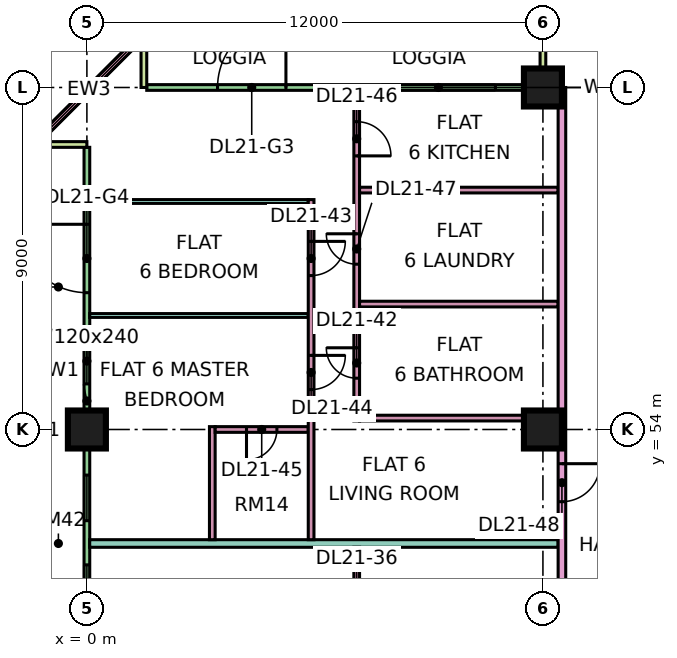
"""IFC4 building model, lengths in metres.
Left out: names, types, materials, properties, quantities, classifications, styles, units other than length and angle.
Written with IfcOpenShell. Run it as: python <this file> out.ifc"""

import sys

from ifc_helpers import new_model, si_unit, direction, frame, frame_2d, origin, origin_2d, place, context, subcontext, project, spatial, rectangle, extrude, element, fill, save


model = new_model("IFC4")
c1 = context("Model", 3, precision=1e-05, world=origin(), true_north=direction((0.0, 1.0)))
c2 = subcontext(c1, "Body", "Model", "MODEL_VIEW")
j1 = project(units=[si_unit("LENGTHUNIT", "METRE"), si_unit("PLANEANGLEUNIT", "RADIAN")], contexts=[c1])
p1 = place(None, origin())
s1 = spatial("IfcSite", under=j1, at=p1, CompositionType="ELEMENT")
p2 = place(p1, origin())
s2 = spatial("IfcBuilding", under=s1, at=p2, CompositionType="ELEMENT")
p3 = place(p2, frame((0.0, 0.0, 95.65)))
s3 = spatial("IfcBuildingStorey", under=s2, at=p3, CompositionType="ELEMENT", Elevation=95.65)
for number, where, z_axis, x_axis in (
    (1, (0.0, 54.0, 0.0), (0.0, 0.0, 1.0), (1.0, 0.0, 0.0)),
    (2, (12.0, 54.0, 0.0), (0.0, 0.0, 1.0), (1.0, 0.0, 0.0)),
    (3, (12.0, 63.0, 0.0), (0.0, 0.0, 1.0), (1.0, 0.0, 0.0)),
):
    element("IfcColumn", number, at=place(p3, frame(where, z_axis=z_axis, x_axis=x_axis)), inside=s3, PredefinedType="COLUMN", context=c2, shape_type="SweptSolid", body=[
        extrude(rectangle(XDim=1.0, YDim=1.0, at=origin_2d()), origin(), (0.0, 0.0, 1.0), 3.75),
    ])
p4 = place(p3, frame((11.925, 63.0, 0.0), z_axis=(0.0, 0.0, 1.0), x_axis=(-1.0, 0.0, 0.0)))
e4 = element("IfcWall", 4, at=p4, inside=s3, PredefinedType="SOLIDWALL", context=c2, shape_type="SweptSolid", body=[
    extrude(rectangle(XDim=10.35, YDim=0.15, at=frame_2d((5.175, 0.0))), origin(), (0.0, 0.0, 1.0), 3.35),
])
p5 = place(p4, frame((1.175, 0.0, 0.45)))
e5 = element("IfcOpeningElement", 5, at=p5, cuts=e4, PredefinedType="OPENING", context=c2, shape_type="SweptSolid", body=[
    extrude(rectangle(XDim=3.0, YDim=2.4, at=frame_2d((1.5, 1.2))), frame((0.0, 0.085, 0.0), z_axis=(0.0, -1.0, 0.0), x_axis=(1.0, 0.0, 0.0)), (0.0, 0.0, 1.0), 0.17),
])
p6 = place(p4, frame((6.688, 0.0, 0.0)))
e6 = element("IfcOpeningElement", 6, at=p6, cuts=e4, PredefinedType="OPENING", context=c2, shape_type="SweptSolid", body=[
    extrude(rectangle(XDim=1.8, YDim=2.4, at=frame_2d((0.9, 1.2))), frame((0.0, 0.085, 0.0), z_axis=(0.0, -1.0, 0.0), x_axis=(1.0, 0.0, 0.0)), (0.0, 0.0, 1.0), 0.17),
])
for number, where, z_axis, x_axis in (
    (7, (12.0, 64.5, 0.0), (0.0, 0.0, 1.0), (0.0, -1.0, 0.0)),
    (8, (1.5, 64.5, 0.0), (0.0, 0.0, 1.0), (0.0, -1.0, 0.0)),
):
    element("IfcWall", number, at=place(p3, frame(where, z_axis=z_axis, x_axis=x_axis)), inside=s3, PredefinedType="SOLIDWALL", context=c2, shape_type="SweptSolid", body=[
        extrude(rectangle(XDim=1.5, YDim=0.15, at=frame_2d((0.75, 0.0))), origin(), (0.0, 0.0, 1.0), 3.35),
    ])
p7 = place(p3, frame((1.553, 64.447, 0.0), z_axis=(0.0, 0.0, 1.0), x_axis=(-0.707106781187, -0.707106781187, 0.0)))
e9 = element("IfcWall", 9, at=p7, inside=s3, PredefinedType="SOLIDWALL", context=c2, shape_type="SweptSolid", body=[
    extrude(rectangle(XDim=4.243, YDim=0.15, at=frame_2d((2.121, 0.0))), origin(), (0.0, 0.0, 1.0), 3.35),
])
p8 = place(p7, frame((0.621, 0.0, 0.45)))
e10 = element("IfcOpeningElement", 10, at=p8, cuts=e9, PredefinedType="OPENING", context=c2, shape_type="SweptSolid", body=[
    extrude(rectangle(XDim=3.0, YDim=2.4, at=frame_2d((1.5, 1.2))), frame((0.0, 0.085, 0.0), z_axis=(0.0, -1.0, 0.0), x_axis=(1.0, 0.0, 0.0)), (0.0, 0.0, 1.0), 0.17),
])
p9 = place(p3, frame((0.0, 61.425, 0.0), z_axis=(0.0, 0.0, 1.0), x_axis=(0.0, -1.0, 0.0)))
e11 = element("IfcWall", 11, at=p9, inside=s3, PredefinedType="SOLIDWALL", context=c2, shape_type="SweptSolid", body=[
    extrude(rectangle(XDim=13.35, YDim=0.15, at=frame_2d((6.675, 0.0))), origin(), (0.0, 0.0, 1.0), 3.35),
])
p10 = place(p9, frame((2.025, 0.0, 0.0)))
e12 = element("IfcOpeningElement", 12, at=p10, cuts=e11, PredefinedType="OPENING", context=c2, shape_type="SweptSolid", body=[
    extrude(rectangle(XDim=1.8, YDim=2.4, at=frame_2d((0.9, 1.2))), frame((0.0, 0.085, 0.0), z_axis=(0.0, -1.0, 0.0), x_axis=(1.0, 0.0, 0.0)), (0.0, 0.0, 1.0), 0.17),
])
p11 = place(p9, frame((5.025, 0.0, 0.45)))
e13 = element("IfcOpeningElement", 13, at=p11, cuts=e11, PredefinedType="OPENING", context=c2, shape_type="SweptSolid", body=[
    extrude(rectangle(XDim=1.2, YDim=2.4, at=frame_2d((0.6, 1.2))), frame((0.0, 0.085, 0.0), z_axis=(0.0, -1.0, 0.0), x_axis=(1.0, 0.0, 0.0)), (0.0, 0.0, 1.0), 0.17),
])
p12 = place(p9, frame((8.625, 0.0, 0.45)))
e14 = element("IfcOpeningElement", 14, at=p12, cuts=e11, PredefinedType="OPENING", context=c2, shape_type="SweptSolid", body=[
    extrude(rectangle(XDim=1.2, YDim=2.4, at=frame_2d((0.6, 1.2))), frame((0.0, 0.085, 0.0), z_axis=(0.0, -1.0, 0.0), x_axis=(1.0, 0.0, 0.0)), (0.0, 0.0, 1.0), 0.17),
])
p13 = place(p9, frame((10.988, 0.0, 0.45)))
e15 = element("IfcOpeningElement", 15, at=p13, cuts=e11, PredefinedType="OPENING", context=c2, shape_type="SweptSolid", body=[
    extrude(rectangle(XDim=1.8, YDim=2.4, at=frame_2d((0.9, 1.2))), frame((0.0, 0.085, 0.0), z_axis=(0.0, -1.0, 0.0), x_axis=(1.0, 0.0, 0.0)), (0.0, 0.0, 1.0), 0.17),
])
p14 = place(p3, frame((-1.5, 61.5, 0.0), z_axis=(0.0, 0.0, 1.0), x_axis=(1.0, 0.0, 0.0)))
e16 = element("IfcWall", 16, at=p14, inside=s3, PredefinedType="SOLIDWALL", context=c2, shape_type="SweptSolid", body=[
    extrude(rectangle(XDim=1.5, YDim=0.15, at=frame_2d((0.75, 0.0))), origin(), (0.0, 0.0, 1.0), 3.35),
])
p15 = place(p3, frame((0.074, 51.0, 0.0), z_axis=(0.0, 0.0, 1.0), x_axis=(1.0, 0.0, 0.0)))
e17 = element("IfcWall", 17, at=p15, inside=s3, PredefinedType="PARTITIONING", context=c2, shape_type="SweptSolid", body=[
    extrude(rectangle(XDim=12.326, YDim=0.2, at=frame_2d((6.163, 0.0))), origin(), (0.0, 0.0, 1.0), 3.35),
])
for number, where, z_axis, x_axis in (
    (18, (0.074, 57.0, 0.0), (0.0, 0.0, 1.0), (1.0, 0.0, 0.0)),
    (19, (0.074, 60.0, 0.0), (0.0, 0.0, 1.0), (1.0, 0.0, 0.0)),
):
    element("IfcWall", number, at=place(p3, frame(where, z_axis=z_axis, x_axis=x_axis)), inside=s3, PredefinedType="PARTITIONING", context=c2, shape_type="SweptSolid", body=[
        extrude(rectangle(XDim=5.751, YDim=0.1, at=frame_2d((2.875, 0.0))), origin(), (0.0, 0.0, 1.0), 3.35),
    ])
p16 = place(p3, frame((3.3, 51.1, 0.0), z_axis=(0.0, 0.0, 1.0), x_axis=(0.0, 1.0, 0.0)))
e20 = element("IfcWall", 20, at=p16, inside=s3, PredefinedType="PARTITIONING", context=c2, shape_type="SweptSolid", body=[
    extrude(rectangle(XDim=2.975, YDim=0.15, at=frame_2d((1.487, 0.0))), origin(), (0.0, 0.0, 1.0), 3.35),
])
p17 = place(p3, frame((3.375, 54.0, 0.0), z_axis=(0.0, 0.0, 1.0), x_axis=(1.0, 0.0, 0.0)))
e21 = element("IfcWall", 21, at=p17, inside=s3, PredefinedType="PARTITIONING", context=c2, shape_type="SweptSolid", body=[
    extrude(rectangle(XDim=2.45, YDim=0.15, at=frame_2d((1.225, 0.0))), origin(), (0.0, 0.0, 1.0), 3.35),
])
p18 = place(p17, frame((0.825, 0.0, 0.0)))
e22 = element("IfcOpeningElement", 22, at=p18, cuts=e21, PredefinedType="OPENING", context=c2, shape_type="SweptSolid", body=[
    extrude(rectangle(XDim=0.8, YDim=2.1, at=frame_2d((0.4, 1.05))), frame((0.0, 0.085, 0.0), z_axis=(0.0, -1.0, 0.0), x_axis=(1.0, 0.0, 0.0)), (0.0, 0.0, 1.0), 0.17),
])
p19 = place(p3, frame((5.9, 51.1, 0.0), z_axis=(0.0, 0.0, 1.0), x_axis=(0.0, 1.0, 0.0)))
e23 = element("IfcWall", 23, at=p19, inside=s3, PredefinedType="PARTITIONING", context=c2, shape_type="SweptSolid", body=[
    extrude(rectangle(XDim=8.95, YDim=0.15, at=frame_2d((4.475, 0.0))), origin(), (0.0, 0.0, 1.0), 3.35),
])
p20 = place(p19, frame((6.95, 0.0, 0.0)))
e24 = element("IfcOpeningElement", 24, at=p20, cuts=e23, PredefinedType="OPENING", context=c2, shape_type="SweptSolid", body=[
    extrude(rectangle(XDim=0.9, YDim=2.1, at=frame_2d((0.45, 1.05))), frame((0.0, 0.085, 0.0), z_axis=(0.0, -1.0, 0.0), x_axis=(1.0, 0.0, 0.0)), (0.0, 0.0, 1.0), 0.17),
])
p21 = place(p19, frame((3.95, 0.0, 0.0)))
e25 = element("IfcOpeningElement", 25, at=p21, cuts=e23, PredefinedType="OPENING", context=c2, shape_type="SweptSolid", body=[
    extrude(rectangle(XDim=0.9, YDim=2.1, at=frame_2d((0.45, 1.05))), frame((0.0, 0.085, 0.0), z_axis=(0.0, -1.0, 0.0), x_axis=(1.0, 0.0, 0.0)), (0.0, 0.0, 1.0), 0.17),
])
p22 = place(p3, frame((7.1, 41.925, 0.0), z_axis=(0.0, 0.0, 1.0), x_axis=(0.0, 1.0, 0.0)))
e26 = element("IfcWall", 26, at=p22, inside=s3, PredefinedType="PARTITIONING", context=c2, shape_type="SweptSolid", body=[
    extrude(rectangle(XDim=8.975, YDim=0.15, at=frame_2d((4.487, 0.0))), origin(), (0.0, 0.0, 1.0), 3.35),
])
p23 = place(p22, frame((7.125, 0.0, 0.0)))
e27 = element("IfcOpeningElement", 27, at=p23, cuts=e26, PredefinedType="OPENING", context=c2, shape_type="SweptSolid", body=[
    extrude(rectangle(XDim=0.9, YDim=2.1, at=frame_2d((0.45, 1.05))), frame((0.0, 0.085, 0.0), z_axis=(0.0, -1.0, 0.0), x_axis=(1.0, 0.0, 0.0)), (0.0, 0.0, 1.0), 0.17),
])
p24 = place(p22, frame((4.125, 0.0, 0.0)))
e28 = element("IfcOpeningElement", 28, at=p24, cuts=e26, PredefinedType="OPENING", context=c2, shape_type="SweptSolid", body=[
    extrude(rectangle(XDim=0.9, YDim=2.1, at=frame_2d((0.45, 1.05))), frame((0.0, 0.085, 0.0), z_axis=(0.0, -1.0, 0.0), x_axis=(1.0, 0.0, 0.0)), (0.0, 0.0, 1.0), 0.17),
])
p25 = place(p3, frame((7.1, 54.225, 0.0), z_axis=(0.0, 0.0, 1.0), x_axis=(0.0, 1.0, 0.0)))
e29 = element("IfcWall", 29, at=p25, inside=s3, PredefinedType="PARTITIONING", context=c2, shape_type="SweptSolid", body=[
    extrude(rectangle(XDim=8.701, YDim=0.15, at=frame_2d((4.351, 0.0))), origin(), (0.0, 0.0, 1.0), 3.35),
])
p26 = place(p25, frame((1.125, 0.0, 0.0)))
e30 = element("IfcOpeningElement", 30, at=p26, cuts=e29, PredefinedType="OPENING", context=c2, shape_type="SweptSolid", body=[
    extrude(rectangle(XDim=0.8, YDim=2.1, at=frame_2d((0.4, 1.05))), frame((0.0, 0.085, 0.0), z_axis=(0.0, -1.0, 0.0), x_axis=(1.0, 0.0, 0.0)), (0.0, 0.0, 1.0), 0.17),
])
p27 = place(p25, frame((6.975, 0.0, 0.0)))
e31 = element("IfcOpeningElement", 31, at=p27, cuts=e29, PredefinedType="OPENING", context=c2, shape_type="SweptSolid", body=[
    extrude(rectangle(XDim=0.9, YDim=2.1, at=frame_2d((0.45, 1.05))), frame((0.0, 0.085, 0.0), z_axis=(0.0, -1.0, 0.0), x_axis=(1.0, 0.0, 0.0)), (0.0, 0.0, 1.0), 0.17),
])
p28 = place(p25, frame((4.125, 0.0, 0.0)))
e32 = element("IfcOpeningElement", 32, at=p28, cuts=e29, PredefinedType="OPENING", context=c2, shape_type="SweptSolid", body=[
    extrude(rectangle(XDim=0.8, YDim=2.1, at=frame_2d((0.4, 1.05))), frame((0.0, 0.085, 0.0), z_axis=(0.0, -1.0, 0.0), x_axis=(1.0, 0.0, 0.0)), (0.0, 0.0, 1.0), 0.17),
])
for number, where, z_axis, x_axis in (
    (33, (7.175, 54.3, 0.0), (0.0, 0.0, 1.0), (1.0, 0.0, 0.0)),
    (34, (7.175, 57.3, 0.0), (0.0, 0.0, 1.0), (1.0, 0.0, 0.0)),
    (35, (7.175, 60.3, 0.0), (0.0, 0.0, 1.0), (1.0, 0.0, 0.0)),
):
    element("IfcWall", number, at=place(p3, frame(where, z_axis=z_axis, x_axis=x_axis)), inside=s3, PredefinedType="PARTITIONING", context=c2, shape_type="SweptSolid", body=[
        extrude(rectangle(XDim=5.225, YDim=0.15, at=frame_2d((2.612, 0.0))), origin(), (0.0, 0.0, 1.0), 3.35),
    ])
p29 = place(p3, frame((12.5, 20.0, 0.0), z_axis=(0.0, 0.0, 1.0), x_axis=(0.0, 1.0, 0.0)))
e36 = element("IfcWall", 36, at=p29, inside=s3, PredefinedType="PARTITIONING", context=c2, shape_type="SweptSolid", body=[
    extrude(rectangle(XDim=43.0, YDim=0.2, at=frame_2d((21.5, 0.0))), origin(), (0.0, 0.0, 1.0), 3.35),
])
p30 = place(p29, frame((28.65, 0.0, 0.0)))
e37 = element("IfcOpeningElement", 37, at=p30, cuts=e36, PredefinedType="OPENING", context=c2, shape_type="SweptSolid", body=[
    extrude(rectangle(XDim=1.0, YDim=2.1, at=frame_2d((0.5, 1.05))), frame((0.0, 0.11, 0.0), z_axis=(0.0, -1.0, 0.0), x_axis=(1.0, 0.0, 0.0)), (0.0, 0.0, 1.0), 0.22),
])
p31 = place(p29, frame((32.1, 0.0, 0.0)))
e38 = element("IfcOpeningElement", 38, at=p31, cuts=e36, PredefinedType="OPENING", context=c2, shape_type="SweptSolid", body=[
    extrude(rectangle(XDim=1.0, YDim=2.1, at=frame_2d((0.5, 1.05))), frame((0.0, 0.11, 0.0), z_axis=(0.0, -1.0, 0.0), x_axis=(1.0, 0.0, 0.0)), (0.0, 0.0, 1.0), 0.22),
])
p32 = place(p29, frame((0.6, 0.0, 0.0)))
e39 = element("IfcOpeningElement", 39, at=p32, cuts=e36, PredefinedType="OPENING", context=c2, shape_type="SweptSolid", body=[
    extrude(rectangle(XDim=1.2, YDim=2.1, at=frame_2d((0.6, 1.05))), frame((0.0, 0.11, 0.0), z_axis=(0.0, -1.0, 0.0), x_axis=(1.0, 0.0, 0.0)), (0.0, 0.0, 1.0), 0.22),
])
p33 = place(p29, frame((11.1, 0.0, 0.0)))
e40 = element("IfcOpeningElement", 40, at=p33, cuts=e36, PredefinedType="OPENING", context=c2, shape_type="SweptSolid", body=[
    extrude(rectangle(XDim=1.0, YDim=2.1, at=frame_2d((0.5, 1.05))), frame((0.0, 0.11, 0.0), z_axis=(0.0, -1.0, 0.0), x_axis=(1.0, 0.0, 0.0)), (0.0, 0.0, 1.0), 0.22),
])
p34 = place(p5, origin())
e41 = element("IfcWindow", 41, at=p34, inside=s3, PartitioningType="SINGLE_PANEL", PredefinedType="WINDOW", context=c2, shape_type="SweptSolid", body=[
    extrude(rectangle(XDim=3.0, YDim=2.4, at=frame_2d((1.5, 1.2))), frame((0.0, 0.03, 0.0), z_axis=(0.0, -1.0, 0.0), x_axis=(1.0, 0.0, 0.0)), (0.0, 0.0, 1.0), 0.06),
])
fill(e5, e41)
p35 = place(p6, frame((1.8, 0.0, 0.0), z_axis=(0.0, 0.0, 1.0), x_axis=(-1.0, 0.0, 0.0)))
e42 = element("IfcDoor", 42, at=p35, inside=s3, OperationType="DOUBLE_DOOR_SINGLE_SWING", PredefinedType="DOOR", context=c2, shape_type="SweptSolid", body=[
    extrude(rectangle(XDim=1.8, YDim=2.4, at=frame_2d((0.9, 1.2))), frame((0.0, 0.025, 0.0), z_axis=(0.0, -1.0, 0.0), x_axis=(1.0, 0.0, 0.0)), (0.0, 0.0, 1.0), 0.05),
])
fill(e6, e42)
p36 = place(p8, origin())
e43 = element("IfcWindow", 43, at=p36, inside=s3, PartitioningType="SINGLE_PANEL", PredefinedType="WINDOW", context=c2, shape_type="SweptSolid", body=[
    extrude(rectangle(XDim=3.0, YDim=2.4, at=frame_2d((1.5, 1.2))), frame((0.0, 0.03, 0.0), z_axis=(0.0, -1.0, 0.0), x_axis=(1.0, 0.0, 0.0)), (0.0, 0.0, 1.0), 0.06),
])
fill(e10, e43)
p37 = place(p10, frame((1.8, 0.0, 0.0), z_axis=(0.0, 0.0, 1.0), x_axis=(-1.0, 0.0, 0.0)))
e44 = element("IfcDoor", 44, at=p37, inside=s3, OperationType="DOUBLE_DOOR_SINGLE_SWING", PredefinedType="DOOR", context=c2, shape_type="SweptSolid", body=[
    extrude(rectangle(XDim=1.8, YDim=2.4, at=frame_2d((0.9, 1.2))), frame((0.0, 0.025, 0.0), z_axis=(0.0, -1.0, 0.0), x_axis=(1.0, 0.0, 0.0)), (0.0, 0.0, 1.0), 0.05),
])
fill(e12, e44)
p38 = place(p11, origin())
e45 = element("IfcWindow", 45, at=p38, inside=s3, PartitioningType="SINGLE_PANEL", PredefinedType="WINDOW", context=c2, shape_type="SweptSolid", body=[
    extrude(rectangle(XDim=1.2, YDim=2.4, at=frame_2d((0.6, 1.2))), frame((0.0, 0.03, 0.0), z_axis=(0.0, -1.0, 0.0), x_axis=(1.0, 0.0, 0.0)), (0.0, 0.0, 1.0), 0.06),
])
fill(e13, e45)
p39 = place(p12, origin())
e46 = element("IfcWindow", 46, at=p39, inside=s3, PartitioningType="SINGLE_PANEL", PredefinedType="WINDOW", context=c2, shape_type="SweptSolid", body=[
    extrude(rectangle(XDim=1.2, YDim=2.4, at=frame_2d((0.6, 1.2))), frame((0.0, 0.03, 0.0), z_axis=(0.0, -1.0, 0.0), x_axis=(1.0, 0.0, 0.0)), (0.0, 0.0, 1.0), 0.06),
])
fill(e14, e46)
p40 = place(p13, origin())
e47 = element("IfcWindow", 47, at=p40, inside=s3, PartitioningType="SINGLE_PANEL", PredefinedType="WINDOW", context=c2, shape_type="SweptSolid", body=[
    extrude(rectangle(XDim=1.8, YDim=2.4, at=frame_2d((0.9, 1.2))), frame((0.0, 0.03, 0.0), z_axis=(0.0, -1.0, 0.0), x_axis=(1.0, 0.0, 0.0)), (0.0, 0.0, 1.0), 0.06),
])
fill(e15, e47)
p41 = place(p26, frame((0.8, 0.0, 0.0), z_axis=(0.0, 0.0, 1.0), x_axis=(-1.0, 0.0, 0.0)))
e48 = element("IfcDoor", 48, at=p41, inside=s3, OperationType="SINGLE_SWING_RIGHT", PredefinedType="DOOR", context=c2, shape_type="SweptSolid", body=[
    extrude(rectangle(XDim=0.8, YDim=2.1, at=frame_2d((0.4, 1.05))), frame((0.0, 0.025, 0.0), z_axis=(0.0, -1.0, 0.0), x_axis=(1.0, 0.0, 0.0)), (0.0, 0.0, 1.0), 0.05),
])
fill(e30, e48)
p42 = place(p20, origin())
e49 = element("IfcDoor", 49, at=p42, inside=s3, OperationType="SINGLE_SWING_RIGHT", PredefinedType="DOOR", context=c2, shape_type="SweptSolid", body=[
    extrude(rectangle(XDim=0.9, YDim=2.1, at=frame_2d((0.45, 1.05))), frame((0.0, 0.025, 0.0), z_axis=(0.0, -1.0, 0.0), x_axis=(1.0, 0.0, 0.0)), (0.0, 0.0, 1.0), 0.05),
])
fill(e24, e49)
p43 = place(p21, origin())
e50 = element("IfcDoor", 50, at=p43, inside=s3, OperationType="SINGLE_SWING_RIGHT", PredefinedType="DOOR", context=c2, shape_type="SweptSolid", body=[
    extrude(rectangle(XDim=0.9, YDim=2.1, at=frame_2d((0.45, 1.05))), frame((0.0, 0.025, 0.0), z_axis=(0.0, -1.0, 0.0), x_axis=(1.0, 0.0, 0.0)), (0.0, 0.0, 1.0), 0.05),
])
fill(e25, e50)
p44 = place(p18, frame((0.8, 0.0, 0.0), z_axis=(0.0, 0.0, 1.0), x_axis=(-1.0, 0.0, 0.0)))
e51 = element("IfcDoor", 51, at=p44, inside=s3, OperationType="SINGLE_SWING_LEFT", PredefinedType="DOOR", context=c2, shape_type="SweptSolid", body=[
    extrude(rectangle(XDim=0.8, YDim=2.1, at=frame_2d((0.4, 1.05))), frame((0.0, 0.025, 0.0), z_axis=(0.0, -1.0, 0.0), x_axis=(1.0, 0.0, 0.0)), (0.0, 0.0, 1.0), 0.05),
])
fill(e22, e51)
p45 = place(p27, frame((0.9, 0.0, 0.0), z_axis=(0.0, 0.0, 1.0), x_axis=(-1.0, 0.0, 0.0)))
e52 = element("IfcDoor", 52, at=p45, inside=s3, OperationType="SINGLE_SWING_LEFT", PredefinedType="DOOR", context=c2, shape_type="SweptSolid", body=[
    extrude(rectangle(XDim=0.9, YDim=2.1, at=frame_2d((0.45, 1.05))), frame((0.0, 0.025, 0.0), z_axis=(0.0, -1.0, 0.0), x_axis=(1.0, 0.0, 0.0)), (0.0, 0.0, 1.0), 0.05),
])
fill(e31, e52)
p46 = place(p28, frame((0.8, 0.0, 0.0), z_axis=(0.0, 0.0, 1.0), x_axis=(-1.0, 0.0, 0.0)))
e53 = element("IfcDoor", 53, at=p46, inside=s3, OperationType="SINGLE_SWING_RIGHT", PredefinedType="DOOR", context=c2, shape_type="SweptSolid", body=[
    extrude(rectangle(XDim=0.8, YDim=2.1, at=frame_2d((0.4, 1.05))), frame((0.0, 0.025, 0.0), z_axis=(0.0, -1.0, 0.0), x_axis=(1.0, 0.0, 0.0)), (0.0, 0.0, 1.0), 0.05),
])
fill(e32, e53)
p47 = place(p31, origin())
e54 = element("IfcDoor", 54, at=p47, inside=s3, OperationType="SINGLE_SWING_RIGHT", PredefinedType="DOOR", context=c2, shape_type="SweptSolid", body=[
    extrude(rectangle(XDim=1.0, YDim=2.1, at=frame_2d((0.5, 1.05))), frame((0.0, 0.025, 0.0), z_axis=(0.0, -1.0, 0.0), x_axis=(1.0, 0.0, 0.0)), (0.0, 0.0, 1.0), 0.05),
])
fill(e38, e54)
save(model, sys.argv[1])
